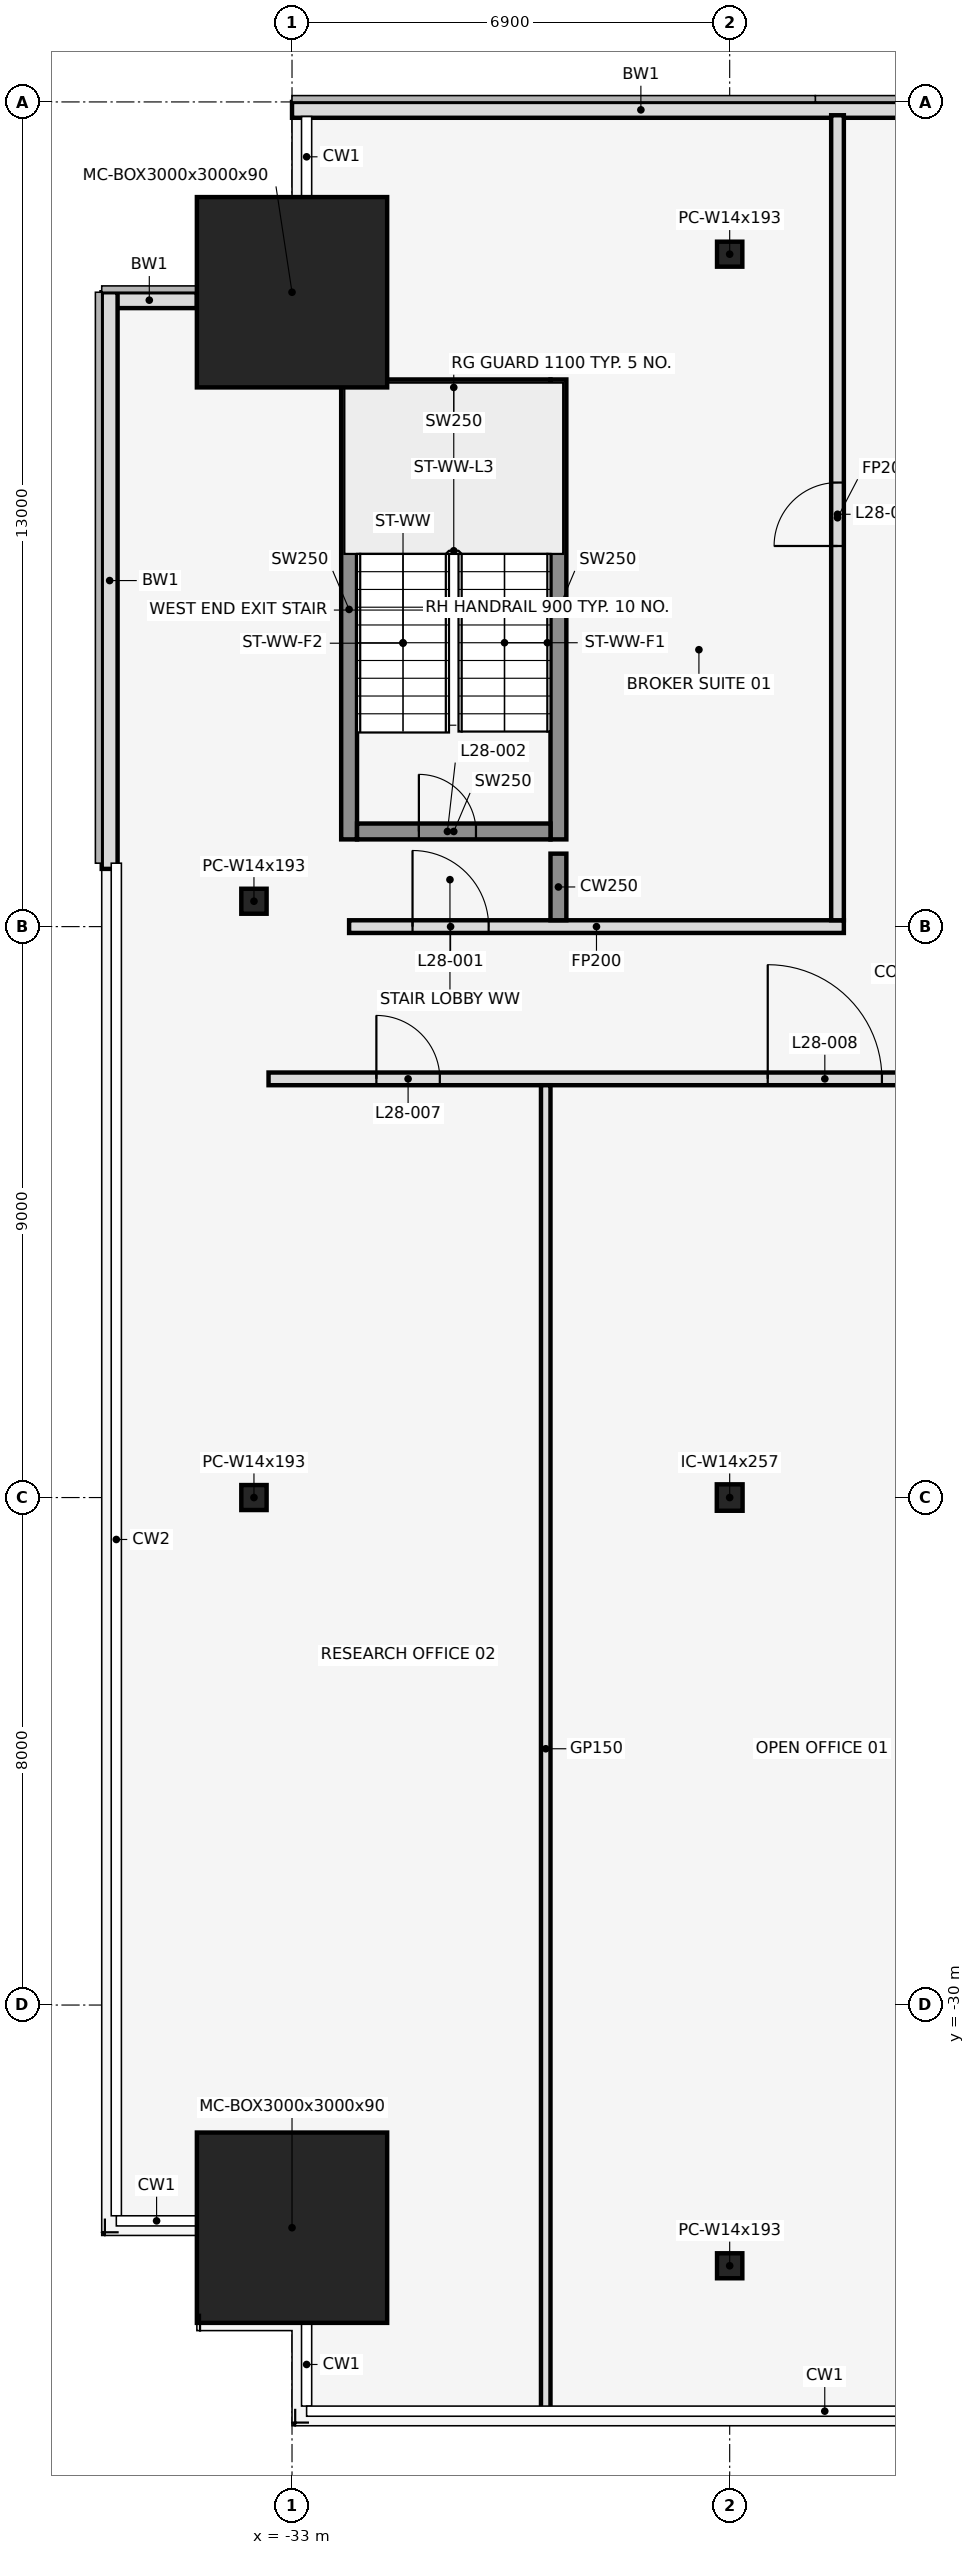
"""IFC4 building model, lengths in metres.
Left out: names, types, materials, properties, quantities, classifications, styles, units other than length and angle.
Written with IfcOpenShell. Run it as: python <this file> out.ifc"""

import sys

from ifc_helpers import new_model, si_unit, direction, frame, frame_2d, origin, origin_2d, place, context, subcontext, project, spatial, rectangle, hollow_rectangle, i_section, extrude, element, fill, save


model = new_model("IFC4")
c1 = context("Model", 3, precision=1e-05, world=origin(), true_north=direction((0.0, 1.0)))
c2 = subcontext(c1, "Body", "Model", "MODEL_VIEW")
j1 = project(units=[si_unit("LENGTHUNIT", "METRE"), si_unit("PLANEANGLEUNIT", "RADIAN")], contexts=[c1])
p1 = place(None, origin())
s1 = spatial("IfcSite", under=j1, at=p1, CompositionType="ELEMENT")
p2 = place(p1, origin())
s2 = spatial("IfcBuilding", under=s1, at=p2, CompositionType="ELEMENT")
p3 = place(p2, frame((0.0, 0.0, 130.9)))
s3 = spatial("IfcBuildingStorey", under=s2, at=p3, CompositionType="ELEMENT", Elevation=130.9)
for number, where, z_axis, x_axis in (
    (1, (-33.0, -33.51, 0.0), (0.0, 0.0, 1.0), (1.0, 0.0, 0.0)),
    (2, (-33.0, -3.0, 0.0), (0.0, 0.0, 1.0), (1.0, 0.0, 0.0)),
):
    element("IfcColumn", number, at=place(p3, frame(where, z_axis=z_axis, x_axis=x_axis)), inside=s3, PredefinedType="COLUMN", context=c2, shape_type="SweptSolid", body=[
        extrude(hollow_rectangle(XDim=3.0, YDim=3.0, WallThickness=0.09, at=origin_2d()), origin(), (0.0, 0.0, 1.0), 4.1),
    ])
for number, where, z_axis, x_axis in (
    (3, (-26.1, -34.11, 0.0), (0.0, 0.0, 1.0), (1.0, 0.0, 0.0)),
    (4, (-26.1, -2.4, 0.0), (0.0, 0.0, 1.0), (1.0, 0.0, 0.0)),
    (5, (-33.6, -12.6, 0.0), (0.0, 0.0, 1.0), (1.0, 0.0, 0.0)),
    (6, (-33.6, -22.0, 0.0), (0.0, 0.0, 1.0), (1.0, 0.0, 0.0)),
):
    element("IfcColumn", number, at=place(p3, frame(where, z_axis=z_axis, x_axis=x_axis)), inside=s3, PredefinedType="COLUMN", context=c2, shape_type="SweptSolid", body=[
        extrude(i_section(OverallWidth=0.399, OverallDepth=0.394, WebThickness=0.023, FlangeThickness=0.037, at=origin_2d()), origin(), (0.0, 0.0, 1.0), 4.1),
    ])
p4 = place(p3, frame((-26.1, -22.0, 0.0), z_axis=(0.0, 0.0, 1.0), x_axis=(1.0, 0.0, 0.0)))
e7 = element("IfcColumn", 7, at=p4, inside=s3, PredefinedType="COLUMN", context=c2, shape_type="SweptSolid", body=[
    extrude(i_section(OverallWidth=0.406, OverallDepth=0.417, WebThickness=0.03, FlangeThickness=0.048, at=origin_2d()), origin(), (0.0, 0.0, 1.0), 4.1),
])
p5 = place(p3, frame((-22.0, -0.125, 0.0), z_axis=(0.0, 0.0, 1.0), x_axis=(-1.0, 0.0, 0.0)))
e8 = element("IfcWall", 8, at=p5, inside=s3, PredefinedType="STANDARD", context=c2, shape_type="SweptSolid", body=[
    extrude(rectangle(XDim=11.0, YDim=0.25, at=frame_2d((5.5, 0.0))), origin(), (0.0, 0.0, 1.0), 3.9),
])
p6 = place(p3, frame((-34.5, -3.125, 0.0), z_axis=(0.0, 0.0, 1.0), x_axis=(-1.0, 0.0, 0.0)))
e9 = element("IfcWall", 9, at=p6, inside=s3, PredefinedType="STANDARD", context=c2, shape_type="SweptSolid", body=[
    extrude(rectangle(XDim=1.5, YDim=0.25, at=frame_2d((0.75, 0.0))), origin(), (0.0, 0.0, 1.0), 3.9),
])
p7 = place(p3, frame((-35.875, -3.0, 0.0), z_axis=(0.0, 0.0, 1.0), x_axis=(0.0, -1.0, 0.0)))
e10 = element("IfcWall", 10, at=p7, inside=s3, PredefinedType="STANDARD", context=c2, shape_type="SweptSolid", body=[
    extrude(rectangle(XDim=9.09, YDim=0.25, at=frame_2d((4.545, 0.0))), origin(), (0.0, 0.0, 1.0), 3.9),
])
for number, where, z_axis, x_axis in (
    (11, (-32.1, -11.625, 0.0), (0.0, 0.0, 1.0), (0.0, 1.0, 0.0)),
    (12, (-28.8, -11.625, 0.0), (0.0, 0.0, 1.0), (0.0, 1.0, 0.0)),
):
    element("IfcWall", number, at=place(p3, frame(where, z_axis=z_axis, x_axis=x_axis)), inside=s3, PredefinedType="SHEAR", context=c2, shape_type="SweptSolid", body=[
        extrude(rectangle(XDim=7.25, YDim=0.25, at=frame_2d((3.625, 0.0))), origin(), (0.0, 0.0, 1.0), 4.1),
    ])
p8 = place(p3, frame((-31.975, -11.5, 0.0), z_axis=(0.0, 0.0, 1.0), x_axis=(1.0, 0.0, 0.0)))
e13 = element("IfcWall", 13, at=p8, inside=s3, PredefinedType="SHEAR", context=c2, shape_type="SweptSolid", body=[
    extrude(rectangle(XDim=3.05, YDim=0.25, at=frame_2d((1.525, 0.0))), origin(), (0.0, 0.0, 1.0), 4.1),
])
p9 = place(p8, frame((0.975, 0.0, 0.0)))
e14 = element("IfcOpeningElement", 14, at=p9, cuts=e13, PredefinedType="OPENING", context=c2, shape_type="SweptSolid", body=[
    extrude(rectangle(XDim=0.9, YDim=2.1, at=frame_2d((0.45, 1.05))), frame((0.0, 0.137, 0.0), z_axis=(0.0, -1.0, 0.0), x_axis=(1.0, 0.0, 0.0)), (0.0, 0.0, 1.0), 0.274),
])
p10 = place(p3, frame((-31.975, -4.5, 0.0), z_axis=(0.0, 0.0, 1.0), x_axis=(1.0, 0.0, 0.0)))
e15 = element("IfcWall", 15, at=p10, inside=s3, PredefinedType="SHEAR", context=c2, shape_type="SweptSolid", body=[
    extrude(rectangle(XDim=3.05, YDim=0.25, at=frame_2d((1.525, 0.0))), origin(), (0.0, 0.0, 1.0), 4.1),
])
p11 = place(p3, frame((-33.37, -15.4, 0.0), z_axis=(0.0, 0.0, 1.0), x_axis=(1.0, 0.0, 0.0)))
e16 = element("IfcWall", 16, at=p11, inside=s3, PredefinedType="PARTITIONING", context=c2, shape_type="SweptSolid", body=[
    extrude(rectangle(XDim=66.74, YDim=0.2, at=frame_2d((33.37, 0.0))), origin(), (0.0, 0.0, 1.0), 2.968),
])
p12 = place(p11, frame((1.7, 0.0, 0.0)))
e17 = element("IfcOpeningElement", 17, at=p12, cuts=e16, PredefinedType="OPENING", context=c2, shape_type="SweptSolid", body=[
    extrude(rectangle(XDim=1.0, YDim=2.1, at=frame_2d((0.5, 1.05))), frame((0.0, 0.112, 0.0), z_axis=(0.0, -1.0, 0.0), x_axis=(1.0, 0.0, 0.0)), (0.0, 0.0, 1.0), 0.224),
])
p13 = place(p11, frame((7.87, 0.0, 0.0)))
e18 = element("IfcOpeningElement", 18, at=p13, cuts=e16, PredefinedType="OPENING", context=c2, shape_type="SweptSolid", body=[
    extrude(rectangle(XDim=1.8, YDim=2.1, at=frame_2d((0.9, 1.05))), frame((0.0, 0.112, 0.0), z_axis=(0.0, -1.0, 0.0), x_axis=(1.0, 0.0, 0.0)), (0.0, 0.0, 1.0), 0.224),
])
p14 = place(p11, frame((15.07, 0.0, 0.0)))
e19 = element("IfcOpeningElement", 19, at=p14, cuts=e16, PredefinedType="OPENING", context=c2, shape_type="SweptSolid", body=[
    extrude(rectangle(XDim=1.8, YDim=2.1, at=frame_2d((0.9, 1.05))), frame((0.0, 0.112, 0.0), z_axis=(0.0, -1.0, 0.0), x_axis=(1.0, 0.0, 0.0)), (0.0, 0.0, 1.0), 0.224),
])
p15 = place(p11, frame((22.27, 0.0, 0.0)))
e20 = element("IfcOpeningElement", 20, at=p15, cuts=e16, PredefinedType="OPENING", context=c2, shape_type="SweptSolid", body=[
    extrude(rectangle(XDim=1.8, YDim=2.1, at=frame_2d((0.9, 1.05))), frame((0.0, 0.112, 0.0), z_axis=(0.0, -1.0, 0.0), x_axis=(1.0, 0.0, 0.0)), (0.0, 0.0, 1.0), 0.224),
])
p16 = place(p11, frame((30.97, 0.0, 0.0)))
e21 = element("IfcOpeningElement", 21, at=p16, cuts=e16, PredefinedType="OPENING", context=c2, shape_type="SweptSolid", body=[
    extrude(rectangle(XDim=1.8, YDim=2.1, at=frame_2d((0.9, 1.05))), frame((0.0, 0.112, 0.0), z_axis=(0.0, -1.0, 0.0), x_axis=(1.0, 0.0, 0.0)), (0.0, 0.0, 1.0), 0.224),
])
p17 = place(p11, frame((39.67, 0.0, 0.0)))
e22 = element("IfcOpeningElement", 22, at=p17, cuts=e16, PredefinedType="OPENING", context=c2, shape_type="SweptSolid", body=[
    extrude(rectangle(XDim=1.8, YDim=2.1, at=frame_2d((0.9, 1.05))), frame((0.0, 0.112, 0.0), z_axis=(0.0, -1.0, 0.0), x_axis=(1.0, 0.0, 0.0)), (0.0, 0.0, 1.0), 0.224),
])
p18 = place(p11, frame((46.97, 0.0, 0.0)))
e23 = element("IfcOpeningElement", 23, at=p18, cuts=e16, PredefinedType="OPENING", context=c2, shape_type="SweptSolid", body=[
    extrude(rectangle(XDim=1.8, YDim=2.1, at=frame_2d((0.9, 1.05))), frame((0.0, 0.112, 0.0), z_axis=(0.0, -1.0, 0.0), x_axis=(1.0, 0.0, 0.0)), (0.0, 0.0, 1.0), 0.224),
])
p19 = place(p11, frame((54.67, 0.0, 0.0)))
e24 = element("IfcOpeningElement", 24, at=p19, cuts=e16, PredefinedType="OPENING", context=c2, shape_type="SweptSolid", body=[
    extrude(rectangle(XDim=0.9, YDim=2.1, at=frame_2d((0.45, 1.05))), frame((0.0, 0.112, 0.0), z_axis=(0.0, -1.0, 0.0), x_axis=(1.0, 0.0, 0.0)), (0.0, 0.0, 1.0), 0.224),
])
p20 = place(p11, frame((60.07, 0.0, 0.0)))
e25 = element("IfcOpeningElement", 25, at=p20, cuts=e16, PredefinedType="OPENING", context=c2, shape_type="SweptSolid", body=[
    extrude(rectangle(XDim=1.8, YDim=2.1, at=frame_2d((0.9, 1.05))), frame((0.0, 0.112, 0.0), z_axis=(0.0, -1.0, 0.0), x_axis=(1.0, 0.0, 0.0)), (0.0, 0.0, 1.0), 0.224),
])
p21 = place(p11, frame((63.97, 0.0, 0.0)))
e26 = element("IfcOpeningElement", 26, at=p21, cuts=e16, PredefinedType="OPENING", context=c2, shape_type="SweptSolid", body=[
    extrude(rectangle(XDim=1.0, YDim=2.1, at=frame_2d((0.5, 1.05))), frame((0.0, 0.112, 0.0), z_axis=(0.0, -1.0, 0.0), x_axis=(1.0, 0.0, 0.0)), (0.0, 0.0, 1.0), 0.224),
])
p22 = place(p3, frame((-32.1, -13.0, 0.0), z_axis=(0.0, 0.0, 1.0), x_axis=(1.0, 0.0, 0.0)))
e27 = element("IfcWall", 27, at=p22, inside=s3, PredefinedType="PARTITIONING", context=c2, shape_type="SweptSolid", body=[
    extrude(rectangle(XDim=7.8, YDim=0.2, at=frame_2d((3.9, 0.0))), origin(), (0.0, 0.0, 1.0), 2.968),
])
p23 = place(p22, frame((1.0, 0.0, 0.0)))
e28 = element("IfcOpeningElement", 28, at=p23, cuts=e27, PredefinedType="OPENING", context=c2, shape_type="SweptSolid", body=[
    extrude(rectangle(XDim=1.2, YDim=2.1, at=frame_2d((0.6, 1.05))), frame((0.0, 0.112, 0.0), z_axis=(0.0, -1.0, 0.0), x_axis=(1.0, 0.0, 0.0)), (0.0, 0.0, 1.0), 0.224),
])
p24 = place(p3, frame((-29.0, -36.42, 0.0), z_axis=(0.0, 0.0, 1.0), x_axis=(0.0, 1.0, 0.0)))
e29 = element("IfcWall", 29, at=p24, inside=s3, PredefinedType="PARTITIONING", context=c2, shape_type="SweptSolid", body=[
    extrude(rectangle(XDim=20.92, YDim=0.15, at=frame_2d((10.46, 0.0))), origin(), (0.0, 0.0, 1.0), 2.968),
])
p25 = place(p3, frame((-28.8, -12.9, 0.0), z_axis=(0.0, 0.0, 1.0), x_axis=(0.0, 1.0, 0.0)))
e30 = element("IfcWall", 30, at=p25, inside=s3, PredefinedType="SHEAR", context=c2, shape_type="SweptSolid", body=[
    extrude(rectangle(XDim=1.05, YDim=0.25, at=frame_2d((0.525, 0.0))), origin(), (0.0, 0.0, 1.0), 4.1),
])
p26 = place(p3, frame((-24.4, -12.9, 0.0), z_axis=(0.0, 0.0, 1.0), x_axis=(0.0, 1.0, 0.0)))
e31 = element("IfcWall", 31, at=p26, inside=s3, PredefinedType="PARTITIONING", context=c2, shape_type="SweptSolid", body=[
    extrude(rectangle(XDim=12.69, YDim=0.2, at=frame_2d((6.345, 0.0))), origin(), (0.0, 0.0, 1.0), 2.968),
])
p27 = place(p26, frame((5.9, 0.0, 0.0)))
e32 = element("IfcOpeningElement", 32, at=p27, cuts=e31, PredefinedType="OPENING", context=c2, shape_type="SweptSolid", body=[
    extrude(rectangle(XDim=1.0, YDim=2.1, at=frame_2d((0.5, 1.05))), frame((0.0, 0.112, 0.0), z_axis=(0.0, -1.0, 0.0), x_axis=(1.0, 0.0, 0.0)), (0.0, 0.0, 1.0), 0.224),
])
p28 = place(p23, origin())
e33 = element("IfcDoor", 33, at=p28, inside=s3, OperationType="SINGLE_SWING_LEFT", PredefinedType="DOOR", context=c2, shape_type="SweptSolid", body=[
    extrude(rectangle(XDim=1.2, YDim=2.1, at=frame_2d((0.6, 1.05))), frame((0.0, 0.025, 0.0), z_axis=(0.0, -1.0, 0.0), x_axis=(1.0, 0.0, 0.0)), (0.0, 0.0, 1.0), 0.05),
])
fill(e28, e33)
p29 = place(p9, origin())
e34 = element("IfcDoor", 34, at=p29, inside=s3, OperationType="SINGLE_SWING_LEFT", PredefinedType="DOOR", context=c2, shape_type="SweptSolid", body=[
    extrude(rectangle(XDim=0.9, YDim=2.1, at=frame_2d((0.45, 1.05))), frame((0.0, 0.025, 0.0), z_axis=(0.0, -1.0, 0.0), x_axis=(1.0, 0.0, 0.0)), (0.0, 0.0, 1.0), 0.05),
])
fill(e14, e34)
p30 = place(p27, origin())
e35 = element("IfcDoor", 35, at=p30, inside=s3, OperationType="SINGLE_SWING_LEFT", PredefinedType="DOOR", context=c2, shape_type="SweptSolid", body=[
    extrude(rectangle(XDim=1.0, YDim=2.1, at=frame_2d((0.5, 1.05))), frame((0.0, 0.025, 0.0), z_axis=(0.0, -1.0, 0.0), x_axis=(1.0, 0.0, 0.0)), (0.0, 0.0, 1.0), 0.05),
])
fill(e32, e35)
p31 = place(p12, frame((1.0, 0.0, 0.0), z_axis=(0.0, 0.0, 1.0), x_axis=(-1.0, 0.0, 0.0)))
e36 = element("IfcDoor", 36, at=p31, inside=s3, OperationType="SINGLE_SWING_LEFT", PredefinedType="DOOR", context=c2, shape_type="SweptSolid", body=[
    extrude(rectangle(XDim=1.0, YDim=2.1, at=frame_2d((0.5, 1.05))), frame((0.0, 0.025, 0.0), z_axis=(0.0, -1.0, 0.0), x_axis=(1.0, 0.0, 0.0)), (0.0, 0.0, 1.0), 0.05),
])
fill(e17, e36)
p32 = place(p13, origin())
e37 = element("IfcDoor", 37, at=p32, inside=s3, OperationType="SINGLE_SWING_LEFT", PredefinedType="DOOR", context=c2, shape_type="SweptSolid", body=[
    extrude(rectangle(XDim=1.8, YDim=2.1, at=frame_2d((0.9, 1.05))), frame((0.0, 0.025, 0.0), z_axis=(0.0, -1.0, 0.0), x_axis=(1.0, 0.0, 0.0)), (0.0, 0.0, 1.0), 0.05),
])
fill(e18, e37)
save(model, sys.argv[1])
